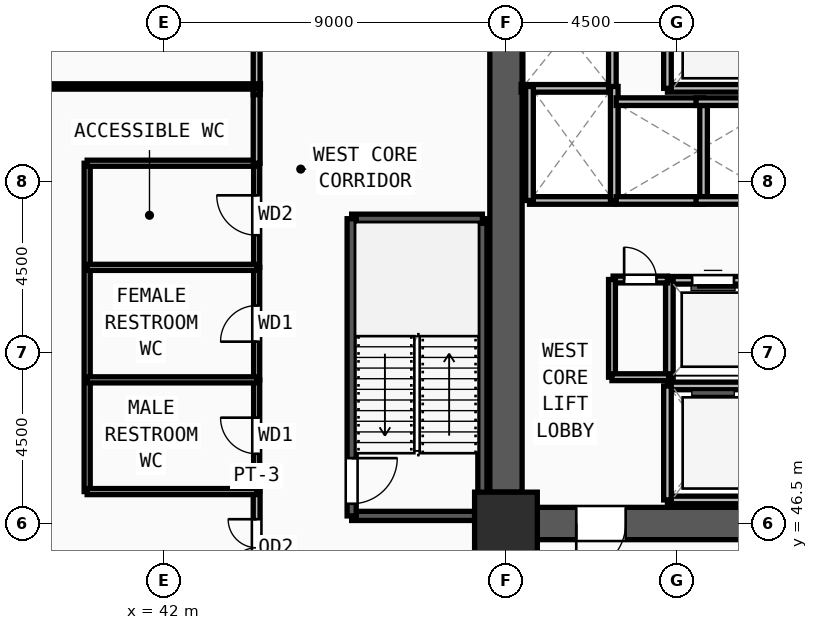
"""IFC4 building model, lengths in metres.
Left out: names, types, materials, properties, quantities, classifications, styles, units other than length and angle.
Written with IfcOpenShell. Run it as: python <this file> out.ifc"""

import sys

from ifc_helpers import new_model, si_unit, direction, frame, frame_2d, origin, origin_2d, place, context, subcontext, project, spatial, rectangle, extrude, source, transform, mapped, element, fill, save


model = new_model("IFC4")
c1 = context("Model", 3, precision=1e-05, world=origin(), true_north=direction((0.0, 1.0)))
c2 = subcontext(c1, "Body", "Model", "MODEL_VIEW")
j1 = project(units=[si_unit("LENGTHUNIT", "METRE"), si_unit("PLANEANGLEUNIT", "RADIAN")], contexts=[c1])
p1 = place(None, origin())
s1 = spatial("IfcSite", under=j1, at=p1, CompositionType="ELEMENT")
p2 = place(p1, origin())
s2 = spatial("IfcBuilding", under=s1, at=p2, CompositionType="ELEMENT")
p3 = place(p2, frame((0.0, 0.0, 51.75)))
s3 = spatial("IfcBuildingStorey", under=s2, at=p3, CompositionType="ELEMENT", Elevation=51.75)
m1 = source(origin(), c2, "Body", "SweptSolid", [
    extrude(rectangle(XDim=1.65, YDim=1.65, at=origin_2d()), origin(), (0.0, 0.0, 1.0), 3.75),
])
p4 = place(p3, frame((51.0, 46.5, 0.0), z_axis=(0.0, 0.0, 1.0), x_axis=(1.0, 0.0, 0.0)))
e1 = element("IfcColumn", 1, at=p4, inside=s3, PredefinedType="COLUMN", context=c2, shape_type="MappedRepresentation", body=[
    mapped(m1, transform((0.0, 0.0, 0.0), x_axis=(1.0, 0.0, 0.0), y_axis=(0.0, 1.0, 0.0), z_axis=(0.0, 0.0, 1.0), scale=1.0)),
])
p5 = place(p3, frame((59.175, 46.5, 0.0), z_axis=(0.0, 0.0, 1.0), x_axis=(-1.0, 0.0, 0.0)))
e2 = element("IfcWall", 2, at=p5, inside=s3, PredefinedType="SHEAR", context=c2, shape_type="SweptSolid", body=[
    extrude(rectangle(XDim=7.35, YDim=0.85, at=frame_2d((3.675, 0.0))), origin(), (0.0, 0.0, 1.0), 3.57),
])
m2 = source(origin(), c2, "Body", "SweptSolid", [
    extrude(rectangle(XDim=1.3, YDim=2.2, at=frame_2d((0.65, 1.1))), frame((0.0, 0.435, 0.0), z_axis=(0.0, -1.0, 0.0), x_axis=(1.0, 0.0, 0.0)), (0.0, 0.0, 1.0), 0.87),
])
p6 = place(p5, frame((5.025, 0.0, 0.0)))
e3 = element("IfcOpeningElement", 3, at=p6, cuts=e2, PredefinedType="OPENING", context=c2, shape_type="MappedRepresentation", body=[
    mapped(m2, transform((0.0, 0.0, 0.0), x_axis=(1.0, 0.0, 0.0), y_axis=(0.0, 1.0, 0.0), z_axis=(0.0, 0.0, 1.0), scale=1.0)),
])
m3 = source(origin(), c2, "Body", "SweptSolid", [
    extrude(rectangle(XDim=1.0, YDim=2.2, at=frame_2d((0.5, 1.1))), frame((0.0, 0.435, 0.0), z_axis=(0.0, -1.0, 0.0), x_axis=(1.0, 0.0, 0.0)), (0.0, 0.0, 1.0), 0.87),
])
p7 = place(p5, frame((0.525, 0.0, 0.0)))
e4 = element("IfcOpeningElement", 4, at=p7, cuts=e2, PredefinedType="OPENING", context=c2, shape_type="MappedRepresentation", body=[
    mapped(m3, transform((0.0, 0.0, 0.0), x_axis=(1.0, 0.0, 0.0), y_axis=(0.0, 1.0, 0.0), z_axis=(0.0, 0.0, 1.0), scale=1.0)),
])
p8 = place(p3, frame((51.0, 47.325, 0.0), z_axis=(0.0, 0.0, 1.0), x_axis=(0.0, 1.0, 0.0)))
e5 = element("IfcWall", 5, at=p8, inside=s3, PredefinedType="SHEAR", context=c2, shape_type="SweptSolid", body=[
    extrude(rectangle(XDim=13.35, YDim=0.85, at=frame_2d((6.675, 0.0))), origin(), (0.0, 0.0, 1.0), 3.57),
])
p9 = place(p3, frame((46.94, 46.7, 0.0), z_axis=(0.0, 0.0, 1.0), x_axis=(1.0, 0.0, 0.0)))
e6 = element("IfcWall", 6, at=p9, inside=s3, PredefinedType="SOLIDWALL", context=c2, shape_type="SweptSolid", body=[
    extrude(rectangle(XDim=3.44, YDim=0.24, at=frame_2d((1.72, 0.0))), origin(), (0.0, 0.0, 1.0), 3.57),
])
p10 = place(p3, frame((50.38, 46.7, 0.0), z_axis=(0.0, 0.0, 1.0), x_axis=(0.0, 1.0, 0.0)))
e7 = element("IfcWall", 7, at=p10, inside=s3, PredefinedType="SOLIDWALL", context=c2, shape_type="SweptSolid", body=[
    extrude(rectangle(XDim=7.82, YDim=0.24, at=frame_2d((3.91, 0.0))), origin(), (0.0, 0.0, 1.0), 3.57),
])
p11 = place(p3, frame((50.38, 54.52, 0.0), z_axis=(0.0, 0.0, 1.0), x_axis=(-1.0, 0.0, 0.0)))
e8 = element("IfcWall", 8, at=p11, inside=s3, PredefinedType="SOLIDWALL", context=c2, shape_type="SweptSolid", body=[
    extrude(rectangle(XDim=3.44, YDim=0.24, at=frame_2d((1.72, 0.0))), origin(), (0.0, 0.0, 1.0), 3.57),
])
p12 = place(p3, frame((46.94, 54.52, 0.0), z_axis=(0.0, 0.0, 1.0), x_axis=(0.0, -1.0, 0.0)))
e9 = element("IfcWall", 9, at=p12, inside=s3, PredefinedType="SOLIDWALL", context=c2, shape_type="SweptSolid", body=[
    extrude(rectangle(XDim=7.82, YDim=0.24, at=frame_2d((3.91, 0.0))), origin(), (0.0, 0.0, 1.0), 3.57),
])
m4 = source(origin(), c2, "Body", "SweptSolid", [
    extrude(rectangle(XDim=1.2, YDim=2.2, at=frame_2d((0.6, 1.1))), frame((0.0, 0.13, 0.0), z_axis=(0.0, -1.0, 0.0), x_axis=(1.0, 0.0, 0.0)), (0.0, 0.0, 1.0), 0.26),
])
p13 = place(p12, frame((6.3, 0.0, 0.0)))
e10 = element("IfcOpeningElement", 10, at=p13, cuts=e9, PredefinedType="OPENING", context=c2, shape_type="MappedRepresentation", body=[
    mapped(m4, transform((0.0, 0.0, 0.0), x_axis=(1.0, 0.0, 0.0), y_axis=(0.0, 1.0, 0.0), z_axis=(0.0, 0.0, 1.0), scale=1.0)),
])
for number, where, z_axis, x_axis in (
    (11, (55.25, 47.12, 0.0), (0.0, 0.0, 1.0), (1.0, 0.0, 0.0)),
    (12, (57.65, 50.12, 0.0), (0.0, 0.0, 1.0), (-1.0, 0.0, 0.0)),
):
    element("IfcWall", number, at=place(p3, frame(where, z_axis=z_axis, x_axis=x_axis)), inside=s3, PredefinedType="SOLIDWALL", context=c2, shape_type="SweptSolid", body=[
        extrude(rectangle(XDim=2.4, YDim=0.2, at=frame_2d((1.2, 0.0))), origin(), (0.0, 0.0, 1.0), 3.57),
    ])
p14 = place(p3, frame((55.25, 50.12, 0.0), z_axis=(0.0, 0.0, 1.0), x_axis=(0.0, -1.0, 0.0)))
e13 = element("IfcWall", 13, at=p14, inside=s3, PredefinedType="SOLIDWALL", context=c2, shape_type="SweptSolid", body=[
    extrude(rectangle(XDim=3.0, YDim=0.2, at=frame_2d((1.5, 0.0))), origin(), (0.0, 0.0, 1.0), 3.57),
])
p15 = place(p3, frame((55.25, 57.95, 0.0), z_axis=(0.0, 0.0, 1.0), x_axis=(1.0, 0.0, 0.0)))
e14 = element("IfcWall", 14, at=p15, inside=s3, PredefinedType="SOLIDWALL", context=c2, shape_type="SweptSolid", body=[
    extrude(rectangle(XDim=2.4, YDim=0.2, at=frame_2d((1.2, 0.0))), origin(), (0.0, 0.0, 1.0), 3.57),
])
p16 = place(p3, frame((55.25, 60.88, 0.0), z_axis=(0.0, 0.0, 1.0), x_axis=(0.0, -1.0, 0.0)))
e15 = element("IfcWall", 15, at=p16, inside=s3, PredefinedType="SOLIDWALL", context=c2, shape_type="SweptSolid", body=[
    extrude(rectangle(XDim=2.93, YDim=0.2, at=frame_2d((1.465, 0.0))), origin(), (0.0, 0.0, 1.0), 3.57),
])
p17 = place(p3, frame((51.4, 57.95, 0.0), z_axis=(0.0, 0.0, 1.0), x_axis=(1.0, 0.0, 0.0)))
e16 = element("IfcWall", 16, at=p17, inside=s3, PredefinedType="SOLIDWALL", context=c2, shape_type="SweptSolid", body=[
    extrude(rectangle(XDim=2.4, YDim=0.2, at=frame_2d((1.2, 0.0))), origin(), (0.0, 0.0, 1.0), 3.57),
])
p18 = place(p3, frame((53.8, 57.95, 0.0), z_axis=(0.0, 0.0, 1.0), x_axis=(0.0, 1.0, 0.0)))
e17 = element("IfcWall", 17, at=p18, inside=s3, PredefinedType="SOLIDWALL", context=c2, shape_type="SweptSolid", body=[
    extrude(rectangle(XDim=2.93, YDim=0.2, at=frame_2d((1.465, 0.0))), origin(), (0.0, 0.0, 1.0), 3.57),
])
p19 = place(p3, frame((51.62, 55.0, 0.0), z_axis=(0.0, 0.0, 1.0), x_axis=(1.0, 0.0, 0.0)))
e18 = element("IfcWall", 18, at=p19, inside=s3, PredefinedType="SOLIDWALL", context=c2, shape_type="SweptSolid", body=[
    extrude(rectangle(XDim=2.23, YDim=0.2, at=frame_2d((1.115, 0.0))), origin(), (0.0, 0.0, 1.0), 3.57),
])
for number, where, z_axis, x_axis in (
    (19, (53.85, 55.0, 0.0), (0.0, 0.0, 1.0), (0.0, 1.0, 0.0)),
    (20, (51.62, 58.0, 0.0), (0.0, 0.0, 1.0), (0.0, -1.0, 0.0)),
):
    element("IfcWall", number, at=place(p3, frame(where, z_axis=z_axis, x_axis=x_axis)), inside=s3, PredefinedType="SOLIDWALL", context=c2, shape_type="SweptSolid", body=[
        extrude(rectangle(XDim=3.0, YDim=0.2, at=frame_2d((1.5, 0.0))), origin(), (0.0, 0.0, 1.0), 3.57),
    ])
p20 = place(p3, frame((57.6, 52.9, 0.0), z_axis=(0.0, 0.0, 1.0), x_axis=(-1.0, 0.0, 0.0)))
e21 = element("IfcWall", 21, at=p20, inside=s3, PredefinedType="SOLIDWALL", context=c2, shape_type="SweptSolid", body=[
    extrude(rectangle(XDim=2.3, YDim=0.2, at=frame_2d((1.15, 0.0))), origin(), (0.0, 0.0, 1.0), 3.57),
])
m5 = source(origin(), c2, "Body", "SweptSolid", [
    extrude(rectangle(XDim=1.1, YDim=2.2, at=frame_2d((0.55, 1.1))), frame((0.0, 0.11, 0.0), z_axis=(0.0, -1.0, 0.0), x_axis=(1.0, 0.0, 0.0)), (0.0, 0.0, 1.0), 0.22),
])
p21 = place(p20, frame((0.6, 0.0, 0.0)))
e22 = element("IfcOpeningElement", 22, at=p21, cuts=e21, PredefinedType="OPENING", context=c2, shape_type="MappedRepresentation", body=[
    mapped(m5, transform((0.0, 0.0, 0.0), x_axis=(1.0, 0.0, 0.0), y_axis=(0.0, 1.0, 0.0), z_axis=(0.0, 0.0, 1.0), scale=1.0)),
])
p22 = place(p3, frame((55.3, 52.9, 0.0), z_axis=(0.0, 0.0, 1.0), x_axis=(0.0, -1.0, 0.0)))
e23 = element("IfcWall", 23, at=p22, inside=s3, PredefinedType="SOLIDWALL", context=c2, shape_type="SweptSolid", body=[
    extrude(rectangle(XDim=2.6, YDim=0.2, at=frame_2d((1.3, 0.0))), origin(), (0.0, 0.0, 1.0), 3.57),
])
p23 = place(p3, frame((53.9, 55.0, 0.0), z_axis=(0.0, 0.0, 1.0), x_axis=(1.0, 0.0, 0.0)))
e24 = element("IfcWall", 24, at=p23, inside=s3, PredefinedType="SOLIDWALL", context=c2, shape_type="SweptSolid", body=[
    extrude(rectangle(XDim=2.3, YDim=0.2, at=frame_2d((1.15, 0.0))), origin(), (0.0, 0.0, 1.0), 3.57),
])
p24 = place(p3, frame((56.2, 55.0, 0.0), z_axis=(0.0, 0.0, 1.0), x_axis=(0.0, 1.0, 0.0)))
e25 = element("IfcWall", 25, at=p24, inside=s3, PredefinedType="SOLIDWALL", context=c2, shape_type="SweptSolid", body=[
    extrude(rectangle(XDim=2.6, YDim=0.2, at=frame_2d((1.3, 0.0))), origin(), (0.0, 0.0, 1.0), 3.57),
])
p25 = place(p3, frame((56.2, 57.6, 0.0), z_axis=(0.0, 0.0, 1.0), x_axis=(-1.0, 0.0, 0.0)))
e26 = element("IfcWall", 26, at=p25, inside=s3, PredefinedType="SOLIDWALL", context=c2, shape_type="SweptSolid", body=[
    extrude(rectangle(XDim=2.3, YDim=0.2, at=frame_2d((1.15, 0.0))), origin(), (0.0, 0.0, 1.0), 3.57),
])
for number, where, z_axis, x_axis in (
    (27, (56.0, 55.0, 0.0), (0.0, 0.0, 1.0), (1.0, 0.0, 0.0)),
    (28, (58.2, 57.6, 0.0), (0.0, 0.0, 1.0), (-1.0, 0.0, 0.0)),
):
    element("IfcWall", number, at=place(p3, frame(where, z_axis=z_axis, x_axis=x_axis)), inside=s3, PredefinedType="SOLIDWALL", context=c2, shape_type="SweptSolid", body=[
        extrude(rectangle(XDim=2.2, YDim=0.2, at=frame_2d((1.1, 0.0))), origin(), (0.0, 0.0, 1.0), 3.57),
    ])
p26 = place(p3, frame((53.82, 52.92, 0.0), z_axis=(0.0, 0.0, 1.0), x_axis=(1.0, 0.0, 0.0)))
e29 = element("IfcWall", 29, at=p26, inside=s3, PredefinedType="PARTITIONING", context=c2, shape_type="SweptSolid", body=[
    extrude(rectangle(XDim=1.43, YDim=0.18, at=frame_2d((0.715, 0.0))), origin(), (0.0, 0.0, 1.0), 3.57),
])
m6 = source(origin(), c2, "Body", "SweptSolid", [
    extrude(rectangle(XDim=0.85, YDim=2.1, at=frame_2d((0.425, 1.05))), frame((0.0, 0.1, 0.0), z_axis=(0.0, -1.0, 0.0), x_axis=(1.0, 0.0, 0.0)), (0.0, 0.0, 1.0), 0.2),
])
p27 = place(p26, frame((0.29, 0.0, 0.0)))
e30 = element("IfcOpeningElement", 30, at=p27, cuts=e29, PredefinedType="OPENING", context=c2, shape_type="MappedRepresentation", body=[
    mapped(m6, transform((0.0, 0.0, 0.0), x_axis=(1.0, 0.0, 0.0), y_axis=(0.0, 1.0, 0.0), z_axis=(0.0, 0.0, 1.0), scale=1.0)),
])
p28 = place(p3, frame((44.44, 47.34, 0.0), z_axis=(0.0, 0.0, 1.0), x_axis=(0.0, 1.0, 0.0)))
e31 = element("IfcWall", 31, at=p28, inside=s3, PredefinedType="PARTITIONING", context=c2, shape_type="SweptSolid", body=[
    extrude(rectangle(XDim=2.94, YDim=0.16, at=frame_2d((1.47, 0.0))), origin(), (0.0, 0.0, 1.0), 3.57),
])
m7 = source(origin(), c2, "Body", "SweptSolid", [
    extrude(rectangle(XDim=0.95, YDim=2.15, at=frame_2d((0.475, 1.075))), frame((0.0, 0.09, 0.0), z_axis=(0.0, -1.0, 0.0), x_axis=(1.0, 0.0, 0.0)), (0.0, 0.0, 1.0), 0.18),
])
p29 = place(p28, frame((0.995, 0.0, 0.0)))
e32 = element("IfcOpeningElement", 32, at=p29, cuts=e31, PredefinedType="OPENING", context=c2, shape_type="MappedRepresentation", body=[
    mapped(m7, transform((0.0, 0.0, 0.0), x_axis=(1.0, 0.0, 0.0), y_axis=(0.0, 1.0, 0.0), z_axis=(0.0, 0.0, 1.0), scale=1.0)),
])
p30 = place(p3, frame((44.44, 50.28, 0.0), z_axis=(0.0, 0.0, 1.0), x_axis=(0.0, 1.0, 0.0)))
e33 = element("IfcWall", 33, at=p30, inside=s3, PredefinedType="PARTITIONING", context=c2, shape_type="SweptSolid", body=[
    extrude(rectangle(XDim=2.96, YDim=0.16, at=frame_2d((1.48, 0.0))), origin(), (0.0, 0.0, 1.0), 3.57),
])
p31 = place(p30, frame((1.005, 0.0, 0.0)))
e34 = element("IfcOpeningElement", 34, at=p31, cuts=e33, PredefinedType="OPENING", context=c2, shape_type="MappedRepresentation", body=[
    mapped(m7, transform((0.0, 0.0, 0.0), x_axis=(1.0, 0.0, 0.0), y_axis=(0.0, 1.0, 0.0), z_axis=(0.0, 0.0, 1.0), scale=1.0)),
])
p32 = place(p3, frame((44.44, 53.24, 0.0), z_axis=(0.0, 0.0, 1.0), x_axis=(0.0, 1.0, 0.0)))
e35 = element("IfcWall", 35, at=p32, inside=s3, PredefinedType="PARTITIONING", context=c2, shape_type="SweptSolid", body=[
    extrude(rectangle(XDim=2.74, YDim=0.16, at=frame_2d((1.37, 0.0))), origin(), (0.0, 0.0, 1.0), 3.57),
])
m8 = source(origin(), c2, "Body", "SweptSolid", [
    extrude(rectangle(XDim=1.05, YDim=2.15, at=frame_2d((0.525, 1.075))), frame((0.0, 0.09, 0.0), z_axis=(0.0, -1.0, 0.0), x_axis=(1.0, 0.0, 0.0)), (0.0, 0.0, 1.0), 0.18),
])
p33 = place(p32, frame((0.845, 0.0, 0.0)))
e36 = element("IfcOpeningElement", 36, at=p33, cuts=e35, PredefinedType="OPENING", context=c2, shape_type="MappedRepresentation", body=[
    mapped(m8, transform((0.0, 0.0, 0.0), x_axis=(1.0, 0.0, 0.0), y_axis=(0.0, 1.0, 0.0), z_axis=(0.0, 0.0, 1.0), scale=1.0)),
])
p34 = place(p3, frame((44.44, 57.785, 0.0), z_axis=(0.0, 0.0, 1.0), x_axis=(0.0, 1.0, 0.0)))
e37 = element("IfcWall", 37, at=p34, inside=s3, PredefinedType="PARTITIONING", context=c2, shape_type="SweptSolid", body=[
    extrude(rectangle(XDim=6.0, YDim=0.18, at=frame_2d((3.0, 0.0))), origin(), (0.0, 0.0, 1.0), 3.57),
])
m9 = source(origin(), c2, "Body", "SweptSolid", [
    extrude(rectangle(XDim=1.0, YDim=2.2, at=frame_2d((0.5, 1.1))), frame((0.0, 0.1, 0.0), z_axis=(0.0, -1.0, 0.0), x_axis=(1.0, 0.0, 0.0)), (0.0, 0.0, 1.0), 0.2),
])
p35 = place(p34, frame((2.5, 0.0, 0.0)))
e38 = element("IfcOpeningElement", 38, at=p35, cuts=e37, PredefinedType="OPENING", context=c2, shape_type="MappedRepresentation", body=[
    mapped(m9, transform((0.0, 0.0, 0.0), x_axis=(1.0, 0.0, 0.0), y_axis=(0.0, 1.0, 0.0), z_axis=(0.0, 0.0, 1.0), scale=1.0)),
])
p36 = place(p3, frame((44.44, 44.385, 0.0), z_axis=(0.0, 0.0, 1.0), x_axis=(0.0, 1.0, 0.0)))
e39 = element("IfcWall", 39, at=p36, inside=s3, PredefinedType="PARTITIONING", context=c2, shape_type="SweptSolid", body=[
    extrude(rectangle(XDim=2.955, YDim=0.18, at=frame_2d((1.478, 0.0))), origin(), (0.0, 0.0, 1.0), 3.57),
])
m10 = source(origin(), c2, "Body", "SweptSolid", [
    extrude(rectangle(XDim=1.5, YDim=2.2, at=frame_2d((0.75, 1.1))), frame((0.0, 0.1, 0.0), z_axis=(0.0, -1.0, 0.0), x_axis=(1.0, 0.0, 0.0)), (0.0, 0.0, 1.0), 0.2),
])
p37 = place(p36, frame((0.728, 0.0, 0.0)))
e40 = element("IfcOpeningElement", 40, at=p37, cuts=e39, PredefinedType="OPENING", context=c2, shape_type="MappedRepresentation", body=[
    mapped(m10, transform((0.0, 0.0, 0.0), x_axis=(1.0, 0.0, 0.0), y_axis=(0.0, 1.0, 0.0), z_axis=(0.0, 0.0, 1.0), scale=1.0)),
])
p38 = place(p3, frame((53.79, 50.35, 0.0), z_axis=(0.0, 0.0, 1.0), x_axis=(0.0, 1.0, 0.0)))
e41 = element("IfcWall", 41, at=p38, inside=s3, PredefinedType="PARTITIONING", context=c2, shape_type="SweptSolid", body=[
    extrude(rectangle(XDim=2.57, YDim=0.18, at=frame_2d((1.285, 0.0))), origin(), (0.0, 0.0, 1.0), 3.57),
])
p39 = place(p3, frame((53.79, 50.35, 0.0), z_axis=(0.0, 0.0, 1.0), x_axis=(1.0, 0.0, 0.0)))
e42 = element("IfcWall", 42, at=p39, inside=s3, PredefinedType="PARTITIONING", context=c2, shape_type="SweptSolid", body=[
    extrude(rectangle(XDim=1.49, YDim=0.18, at=frame_2d((0.745, 0.0))), origin(), (0.0, 0.0, 1.0), 3.57),
])
p40 = place(p3, frame((39.98, 47.34, 0.0), z_axis=(0.0, 0.0, 1.0), x_axis=(0.0, 1.0, 0.0)))
e43 = element("IfcWall", 43, at=p40, inside=s3, PredefinedType="PARTITIONING", context=c2, shape_type="SweptSolid", body=[
    extrude(rectangle(XDim=8.64, YDim=0.16, at=frame_2d((4.32, 0.0))), origin(), (0.0, 0.0, 1.0), 3.57),
])
for number, where, z_axis, x_axis in (
    (44, (39.98, 47.34, 0.0), (0.0, 0.0, 1.0), (1.0, 0.0, 0.0)),
    (45, (39.98, 50.28, 0.0), (0.0, 0.0, 1.0), (1.0, 0.0, 0.0)),
    (46, (39.98, 53.24, 0.0), (0.0, 0.0, 1.0), (1.0, 0.0, 0.0)),
    (47, (39.98, 55.98, 0.0), (0.0, 0.0, 1.0), (1.0, 0.0, 0.0)),
):
    element("IfcWall", number, at=place(p3, frame(where, z_axis=z_axis, x_axis=x_axis)), inside=s3, PredefinedType="PARTITIONING", context=c2, shape_type="SweptSolid", body=[
        extrude(rectangle(XDim=4.46, YDim=0.16, at=frame_2d((2.23, 0.0))), origin(), (0.0, 0.0, 1.0), 3.57),
    ])
p41 = place(p3, frame((44.44, 55.98, 0.0), z_axis=(0.0, 0.0, 1.0), x_axis=(0.0, 1.0, 0.0)))
e48 = element("IfcWall", 48, at=p41, inside=s3, PredefinedType="PARTITIONING", context=c2, shape_type="SweptSolid", body=[
    extrude(rectangle(XDim=1.805, YDim=0.18, at=frame_2d((0.902, 0.0))), origin(), (0.0, 0.0, 1.0), 3.57),
])
p42 = place(p3, frame((44.54, 58.0, 0.0), z_axis=(0.0, 0.0, 1.0), x_axis=(-1.0, 0.0, 0.0)))
e49 = element("IfcWall", 49, at=p42, inside=s3, PredefinedType="PARTITIONING", context=c2, shape_type="SweptSolid", body=[
    extrude(rectangle(XDim=18.279, YDim=0.14, at=frame_2d((9.14, 0.0))), origin(), (0.0, 0.0, 1.0), 3.57),
])
m11 = source(origin(), c2, "Body", "SweptSolid", [
    extrude(rectangle(XDim=1.3, YDim=2.2, at=frame_2d((0.65, 1.1))), frame((0.0, 0.025, 0.0), z_axis=(0.0, -1.0, 0.0), x_axis=(1.0, 0.0, 0.0)), (0.0, 0.0, 1.0), 0.05),
])
p43 = place(p6, origin())
e50 = element("IfcDoor", 50, at=p43, inside=s3, OperationType="SINGLE_SWING_RIGHT", PredefinedType="DOOR", context=c2, shape_type="MappedRepresentation", body=[
    mapped(m11, transform((0.0, 0.0, 0.0), x_axis=(1.0, 0.0, 0.0), y_axis=(0.0, 1.0, 0.0), z_axis=(0.0, 0.0, 1.0), scale=1.0)),
])
fill(e3, e50)
m12 = source(origin(), c2, "Body", "SweptSolid", [
    extrude(rectangle(XDim=1.2, YDim=2.2, at=frame_2d((0.6, 1.1))), frame((0.0, 0.025, 0.0), z_axis=(0.0, -1.0, 0.0), x_axis=(1.0, 0.0, 0.0)), (0.0, 0.0, 1.0), 0.05),
])
p44 = place(p13, origin())
e51 = element("IfcDoor", 51, at=p44, inside=s3, OperationType="SINGLE_SWING_LEFT", PredefinedType="DOOR", context=c2, shape_type="MappedRepresentation", body=[
    mapped(m12, transform((0.0, 0.0, 0.0), x_axis=(1.0, 0.0, 0.0), y_axis=(0.0, 1.0, 0.0), z_axis=(0.0, 0.0, 1.0), scale=1.0)),
])
fill(e10, e51)
m13 = source(origin(), c2, "Body", "SweptSolid", [
    extrude(rectangle(XDim=1.1, YDim=2.2, at=frame_2d((0.55, 1.1))), frame((0.0, 0.025, 0.0), z_axis=(0.0, -1.0, 0.0), x_axis=(1.0, 0.0, 0.0)), (0.0, 0.0, 1.0), 0.05),
])
p45 = place(p21, origin())
e52 = element("IfcDoor", 52, at=p45, inside=s3, OperationType="SLIDING_TO_LEFT", PredefinedType="DOOR", context=c2, shape_type="MappedRepresentation", body=[
    mapped(m13, transform((0.0, 0.0, 0.0), x_axis=(1.0, 0.0, 0.0), y_axis=(0.0, 1.0, 0.0), z_axis=(0.0, 0.0, 1.0), scale=1.0)),
])
fill(e22, e52)
m14 = source(origin(), c2, "Body", "SweptSolid", [
    extrude(rectangle(XDim=0.85, YDim=2.1, at=frame_2d((0.425, 1.05))), frame((0.0, 0.025, 0.0), z_axis=(0.0, -1.0, 0.0), x_axis=(1.0, 0.0, 0.0)), (0.0, 0.0, 1.0), 0.05),
])
p46 = place(p27, origin())
e53 = element("IfcDoor", 53, at=p46, inside=s3, OperationType="SINGLE_SWING_LEFT", PredefinedType="DOOR", context=c2, shape_type="MappedRepresentation", body=[
    mapped(m14, transform((0.0, 0.0, 0.0), x_axis=(1.0, 0.0, 0.0), y_axis=(0.0, 1.0, 0.0), z_axis=(0.0, 0.0, 1.0), scale=1.0)),
])
fill(e30, e53)
m15 = source(origin(), c2, "Body", "SweptSolid", [
    extrude(rectangle(XDim=0.95, YDim=2.15, at=frame_2d((0.475, 1.075))), frame((0.0, 0.025, 0.0), z_axis=(0.0, -1.0, 0.0), x_axis=(1.0, 0.0, 0.0)), (0.0, 0.0, 1.0), 0.05),
])
p47 = place(p29, origin())
e54 = element("IfcDoor", 54, at=p47, inside=s3, OperationType="SINGLE_SWING_RIGHT", PredefinedType="DOOR", context=c2, shape_type="MappedRepresentation", body=[
    mapped(m15, transform((0.0, 0.0, 0.0), x_axis=(1.0, 0.0, 0.0), y_axis=(0.0, 1.0, 0.0), z_axis=(0.0, 0.0, 1.0), scale=1.0)),
])
fill(e32, e54)
p48 = place(p31, origin())
e55 = element("IfcDoor", 55, at=p48, inside=s3, OperationType="SINGLE_SWING_LEFT", PredefinedType="DOOR", context=c2, shape_type="MappedRepresentation", body=[
    mapped(m15, transform((0.0, 0.0, 0.0), x_axis=(1.0, 0.0, 0.0), y_axis=(0.0, 1.0, 0.0), z_axis=(0.0, 0.0, 1.0), scale=1.0)),
])
fill(e34, e55)
m16 = source(origin(), c2, "Body", "SweptSolid", [
    extrude(rectangle(XDim=1.05, YDim=2.15, at=frame_2d((0.525, 1.075))), frame((0.0, 0.025, 0.0), z_axis=(0.0, -1.0, 0.0), x_axis=(1.0, 0.0, 0.0)), (0.0, 0.0, 1.0), 0.05),
])
p49 = place(p33, origin())
e56 = element("IfcDoor", 56, at=p49, inside=s3, OperationType="SINGLE_SWING_RIGHT", PredefinedType="DOOR", context=c2, shape_type="MappedRepresentation", body=[
    mapped(m16, transform((0.0, 0.0, 0.0), x_axis=(1.0, 0.0, 0.0), y_axis=(0.0, 1.0, 0.0), z_axis=(0.0, 0.0, 1.0), scale=1.0)),
])
fill(e36, e56)
m17 = source(origin(), c2, "Body", "SweptSolid", [
    extrude(rectangle(XDim=1.5, YDim=2.2, at=frame_2d((0.75, 1.1))), frame((0.0, 0.025, 0.0), z_axis=(0.0, -1.0, 0.0), x_axis=(1.0, 0.0, 0.0)), (0.0, 0.0, 1.0), 0.05),
])
p50 = place(p37, origin())
e57 = element("IfcDoor", 57, at=p50, inside=s3, OperationType="DOUBLE_DOOR_SINGLE_SWING", PredefinedType="DOOR", context=c2, shape_type="MappedRepresentation", body=[
    mapped(m17, transform((0.0, 0.0, 0.0), x_axis=(1.0, 0.0, 0.0), y_axis=(0.0, 1.0, 0.0), z_axis=(0.0, 0.0, 1.0), scale=1.0)),
])
fill(e40, e57)
save(model, sys.argv[1])
